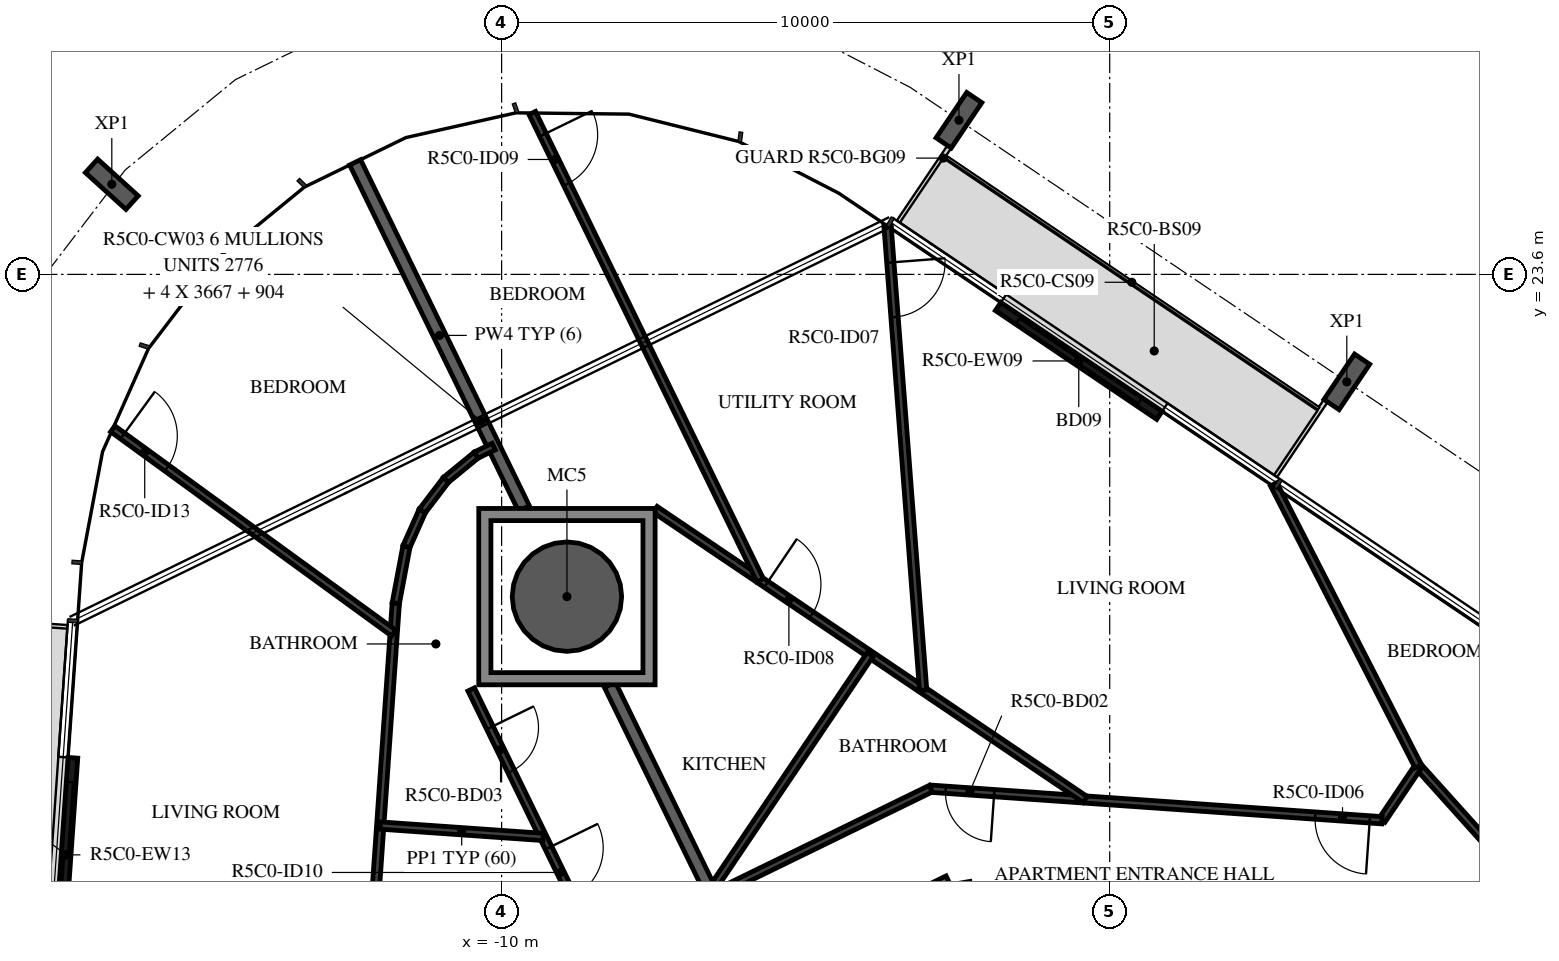
"""IFC4 building model, lengths in metres.
Left out: names, types, materials, properties, quantities, classifications, styles, units other than length and angle.
Written with IfcOpenShell. Run it as: python <this file> out.ifc"""

import sys

from ifc_helpers import new_model, si_unit, direction, frame, frame_2d, origin, origin_2d, place, context, subcontext, project, spatial, polyline, rectangle, hollow_circle, i_section, outline, extrude, element, fill, save


model = new_model("IFC4")
c1 = context("Model", 3, precision=1e-05, world=origin(), true_north=direction((0.0, 1.0)))
c2 = subcontext(c1, "Body", "Model", "MODEL_VIEW")
j1 = project(units=[si_unit("LENGTHUNIT", "METRE"), si_unit("PLANEANGLEUNIT", "RADIAN")], contexts=[c1])
p1 = place(None, origin())
s1 = spatial("IfcSite", under=j1, at=p1, CompositionType="ELEMENT")
p2 = place(p1, origin())
s2 = spatial("IfcBuilding", under=s1, at=p2, CompositionType="ELEMENT")
p3 = place(p2, frame((0.0, 0.0, 209.4)))
s3 = spatial("IfcBuildingStorey", under=s2, at=p3, CompositionType="ELEMENT", Elevation=209.4)
p4 = place(p3, frame((-8.926, 18.301, -0.38), z_axis=(0.0, 0.0, 1.0), x_axis=(1.0, 0.0, 0.0)))
e1 = element("IfcColumn", 1, at=p4, inside=s3, PredefinedType="COLUMN", context=c2, shape_type="SweptSolid", body=[
    extrude(hollow_circle(Radius=0.9, WallThickness=0.04, at=origin_2d()), origin(), (0.0, 0.0, 1.0), 3.5),
])
for number, where, z_axis, x_axis in (
    (2, (3.899, 21.833, -0.38), (0.0, 0.0, 1.0), (0.829, -0.559, 0.0)),
    (3, (-2.479, 26.135, -0.38), (0.0, 0.0, 1.0), (0.829, -0.559, 0.0)),
    (4, (-16.411, 25.082, -0.38), (0.0, 0.0, 1.0), (0.671, 0.741, 0.0)),
):
    element("IfcColumn", number, at=place(p3, frame(where, z_axis=z_axis, x_axis=x_axis)), inside=s3, PredefinedType="COLUMN", context=c2, shape_type="SweptSolid", body=[
        extrude(i_section(OverallWidth=0.3, OverallDepth=0.9, WebThickness=0.019, FlangeThickness=0.035, FilletRadius=0.03, at=origin_2d()), origin(), (0.0, 0.0, 1.0), 3.5),
    ])
p5 = place(p3, frame((0.818, 21.282, 0.0), z_axis=(0.0, 0.0, 1.0), x_axis=(-0.829044984211, 0.559181915082, 0.0)))
e5 = element("IfcWall", 5, at=p5, inside=s3, PredefinedType="STANDARD", context=c2, shape_type="SweptSolid", body=[
    extrude(rectangle(XDim=3.2, YDim=0.16, at=frame_2d((1.6, 0.0))), origin(), (0.0, 0.0, 1.0), 3.12),
])
p6 = place(p5, frame((0.4, 0.0, 0.0)))
e6 = element("IfcOpeningElement", 6, at=p6, cuts=e5, PredefinedType="OPENING", context=c2, shape_type="SweptSolid", body=[
    extrude(rectangle(XDim=2.4, YDim=2.4, at=frame_2d((1.2, 1.2))), frame((0.0, 0.09, 0.0), z_axis=(0.0, -1.0, 0.0), x_axis=(1.0, 0.0, 0.0)), (0.0, 0.0, 1.0), 0.18),
])
p7 = place(p3, frame((-17.051, 15.65, 0.0), z_axis=(0.0, 0.0, 1.0), x_axis=(-0.069734222855, -0.997565605944, 0.0)))
e7 = element("IfcWall", 7, at=p7, inside=s3, PredefinedType="STANDARD", context=c2, shape_type="SweptSolid", body=[
    extrude(rectangle(XDim=3.2, YDim=0.16, at=frame_2d((1.6, 0.0))), origin(), (0.0, 0.0, 1.0), 3.12),
])
p8 = place(p7, frame((0.4, 0.0, 0.0)))
e8 = element("IfcOpeningElement", 8, at=p8, cuts=e7, PredefinedType="OPENING", context=c2, shape_type="SweptSolid", body=[
    extrude(rectangle(XDim=2.4, YDim=2.4, at=frame_2d((1.2, 1.2))), frame((0.0, 0.09, 0.0), z_axis=(0.0, -1.0, 0.0), x_axis=(1.0, 0.0, 0.0)), (0.0, 0.0, 1.0), 0.18),
])
p9 = place(p3, frame((-2.647, 13.618, 0.0), z_axis=(0.0, 0.0, 1.0), x_axis=(-0.898796543751, -0.438366026218, 0.0)))
e9 = element("IfcWall", 9, at=p9, inside=s3, PredefinedType="STANDARD", context=c2, shape_type="SweptSolid", body=[
    extrude(rectangle(XDim=7.181, YDim=0.2, at=frame_2d((3.591, 0.0))), origin(), (0.0, 0.0, 1.0), 3.12),
])
p10 = place(p3, frame((-8.219, 16.851, 0.0), z_axis=(0.0, 0.0, 1.0), x_axis=(0.438291091101, -0.898833087654, 0.0)))
e10 = element("IfcWall", 10, at=p10, inside=s3, PredefinedType="STANDARD", context=c2, shape_type="SweptSolid", body=[
    extrude(rectangle(XDim=3.774, YDim=0.2, at=frame_2d((1.887, 0.0))), origin(), (0.0, 0.0, 1.0), 3.12),
])
p11 = place(p3, frame((-12.409, 25.442, 0.0), z_axis=(0.0, 0.0, 1.0), x_axis=(0.43838641251, -0.898786600549, 0.0)))
e11 = element("IfcWall", 11, at=p11, inside=s3, PredefinedType="STANDARD", context=c2, shape_type="SweptSolid", body=[
    extrude(rectangle(XDim=6.333, YDim=0.2, at=frame_2d((3.166, 0.0))), origin(), (0.0, 0.0, 1.0), 3.12),
])
p12 = place(p3, frame((7.269, 13.07, 0.0), z_axis=(0.0, 0.0, 1.0), x_axis=(-0.668495993587, 0.743715743116, 0.0)))
e12 = element("IfcWall", 12, at=p12, inside=s3, PredefinedType="PARTITIONING", context=c2, shape_type="SweptSolid", body=[
    extrude(rectangle(XDim=3.281, YDim=0.12, at=frame_2d((1.641, 0.0))), origin(), (0.0, 0.0, 1.0), 3.12),
])
p13 = place(p12, frame((0.2, 0.0, 0.0)))
e13 = element("IfcOpeningElement", 13, at=p13, cuts=e12, PredefinedType="OPENING", context=c2, shape_type="SweptSolid", body=[
    extrude(rectangle(XDim=0.9, YDim=2.1, at=frame_2d((0.45, 1.05))), frame((0.0, 0.07, 0.0), z_axis=(0.0, -1.0, 0.0), x_axis=(1.0, 0.0, 0.0)), (0.0, 0.0, 1.0), 0.14),
])
p14 = place(p3, frame((5.075, 15.51, 0.0), z_axis=(0.0, 0.0, 1.0), x_axis=(-0.559221936342, -0.829017988896, 0.0)))
e14 = element("IfcWall", 14, at=p14, inside=s3, PredefinedType="PARTITIONING", context=c2, shape_type="SweptSolid", body=[
    extrude(rectangle(XDim=1.07, YDim=0.12, at=frame_2d((0.535, 0.0))), origin(), (0.0, 0.0, 1.0), 3.12),
])
p15 = place(p3, frame((4.477, 14.623, 0.0), z_axis=(0.0, 0.0, 1.0), x_axis=(-0.997564862172, 0.069744861884, 0.0)))
e15 = element("IfcWall", 15, at=p15, inside=s3, PredefinedType="PARTITIONING", context=c2, shape_type="SweptSolid", body=[
    extrude(rectangle(XDim=7.438, YDim=0.12, at=frame_2d((3.719, 0.0))), origin(), (0.0, 0.0, 1.0), 3.12),
])
p16 = place(p15, frame((0.2, 0.0, 0.0)))
e16 = element("IfcOpeningElement", 16, at=p16, cuts=e15, PredefinedType="OPENING", context=c2, shape_type="SweptSolid", body=[
    extrude(rectangle(XDim=0.9, YDim=2.1, at=frame_2d((0.45, 1.05))), frame((0.0, 0.07, 0.0), z_axis=(0.0, -1.0, 0.0), x_axis=(1.0, 0.0, 0.0)), (0.0, 0.0, 1.0), 0.14),
])
p17 = place(p15, frame((6.392, 0.0, 0.0)))
e17 = element("IfcOpeningElement", 17, at=p17, cuts=e15, PredefinedType="OPENING", context=c2, shape_type="SweptSolid", body=[
    extrude(rectangle(XDim=0.8, YDim=2.1, at=frame_2d((0.4, 1.05))), frame((0.0, 0.07, 0.0), z_axis=(0.0, -1.0, 0.0), x_axis=(1.0, 0.0, 0.0)), (0.0, 0.0, 1.0), 0.14),
])
p18 = place(p3, frame((-2.943, 15.142, 0.0), z_axis=(0.0, 0.0, 1.0), x_axis=(-0.89881075705, -0.438336883014, 0.0)))
e18 = element("IfcWall", 18, at=p18, inside=s3, PredefinedType="PARTITIONING", context=c2, shape_type="SweptSolid", body=[
    extrude(rectangle(XDim=3.992, YDim=0.12, at=frame_2d((1.996, 0.0))), origin(), (0.0, 0.0, 1.0), 3.12),
])
p19 = place(p3, frame((2.696, 20.148, 0.0), z_axis=(0.0, 0.0, 1.0), x_axis=(0.456387956197, -0.889780890691, 0.0)))
e19 = element("IfcWall", 19, at=p19, inside=s3, PredefinedType="PARTITIONING", context=c2, shape_type="SweptSolid", body=[
    extrude(rectangle(XDim=5.213, YDim=0.12, at=frame_2d((2.606, 0.0))), origin(), (0.0, 0.0, 1.0), 3.12),
])
p20 = place(p3, frame((-7.476, 19.735, 0.0), z_axis=(0.0, 0.0, 1.0), x_axis=(0.829035412992, -0.559196105142, 0.0)))
e20 = element("IfcWall", 20, at=p20, inside=s3, PredefinedType="PARTITIONING", context=c2, shape_type="SweptSolid", body=[
    extrude(rectangle(XDim=8.531, YDim=0.12, at=frame_2d((4.266, 0.0))), origin(), (0.0, 0.0, 1.0), 3.12),
])
p21 = place(p20, frame((2.204, 0.0, 0.0)))
e21 = element("IfcOpeningElement", 21, at=p21, cuts=e20, PredefinedType="OPENING", context=c2, shape_type="SweptSolid", body=[
    extrude(rectangle(XDim=0.9, YDim=2.1, at=frame_2d((0.45, 1.05))), frame((0.0, 0.07, 0.0), z_axis=(0.0, -1.0, 0.0), x_axis=(1.0, 0.0, 0.0)), (0.0, 0.0, 1.0), 0.14),
])
p22 = place(p3, frame((-3.653, 24.394, 0.0), z_axis=(0.0, 0.0, 1.0), x_axis=(0.076513576433, -0.997068539581, 0.0)))
e22 = element("IfcWall", 22, at=p22, inside=s3, PredefinedType="PARTITIONING", context=c2, shape_type="SweptSolid", body=[
    extrude(rectangle(XDim=7.655, YDim=0.12, at=frame_2d((3.827, 0.0))), origin(), (0.0, 0.0, 1.0), 3.12),
])
p23 = place(p22, frame((0.6, 0.0, 0.0)))
e23 = element("IfcOpeningElement", 23, at=p23, cuts=e22, PredefinedType="OPENING", context=c2, shape_type="SweptSolid", body=[
    extrude(rectangle(XDim=0.9, YDim=2.1, at=frame_2d((0.45, 1.05))), frame((0.0, 0.07, 0.0), z_axis=(0.0, -1.0, 0.0), x_axis=(1.0, 0.0, 0.0)), (0.0, 0.0, 1.0), 0.14),
])
p24 = place(p3, frame((-3.939, 17.35, 0.0), z_axis=(0.0, 0.0, 1.0), x_axis=(-0.559193216274, -0.829037361566, 0.0)))
e24 = element("IfcWall", 24, at=p24, inside=s3, PredefinedType="PARTITIONING", context=c2, shape_type="SweptSolid", body=[
    extrude(rectangle(XDim=4.694, YDim=0.12, at=frame_2d((2.347, 0.0))), origin(), (0.0, 0.0, 1.0), 3.12),
])
p25 = place(p3, frame((-9.496, 26.254, 0.0), z_axis=(0.0, 0.0, 1.0), x_axis=(0.438361739807, -0.89879863433, 0.0)))
e25 = element("IfcWall", 25, at=p25, inside=s3, PredefinedType="PARTITIONING", context=c2, shape_type="SweptSolid", body=[
    extrude(rectangle(XDim=8.549, YDim=0.12, at=frame_2d((4.274, 0.0))), origin(), (0.0, 0.0, 1.0), 3.12),
])
p26 = place(p25, frame((0.4, 0.0, 0.0)))
e26 = element("IfcOpeningElement", 26, at=p26, cuts=e25, PredefinedType="OPENING", context=c2, shape_type="SweptSolid", body=[
    extrude(rectangle(XDim=0.9, YDim=2.1, at=frame_2d((0.45, 1.05))), frame((0.0, 0.07, 0.0), z_axis=(0.0, -1.0, 0.0), x_axis=(1.0, 0.0, 0.0)), (0.0, 0.0, 1.0), 0.14),
])
p27 = place(p3, frame((-10.5, 16.775, 0.0), z_axis=(0.0, 0.0, 1.0), x_axis=(0.438345136783, -0.898806731761, 0.0)))
e27 = element("IfcWall", 27, at=p27, inside=s3, PredefinedType="PARTITIONING", context=c2, shape_type="SweptSolid", body=[
    extrude(rectangle(XDim=4.78, YDim=0.12, at=frame_2d((2.39, 0.0))), origin(), (0.0, 0.0, 1.0), 3.12),
])
p28 = place(p27, frame((0.7, 0.0, 0.0)))
e28 = element("IfcOpeningElement", 28, at=p28, cuts=e27, PredefinedType="OPENING", context=c2, shape_type="SweptSolid", body=[
    extrude(rectangle(XDim=0.8, YDim=2.1, at=frame_2d((0.4, 1.05))), frame((0.0, 0.07, 0.0), z_axis=(0.0, -1.0, 0.0), x_axis=(1.0, 0.0, 0.0)), (0.0, 0.0, 1.0), 0.14),
])
p29 = place(p27, frame((2.899, 0.0, 0.0)))
e29 = element("IfcOpeningElement", 29, at=p29, cuts=e27, PredefinedType="OPENING", context=c2, shape_type="SweptSolid", body=[
    extrude(rectangle(XDim=0.9, YDim=2.1, at=frame_2d((0.45, 1.05))), frame((0.0, 0.07, 0.0), z_axis=(0.0, -1.0, 0.0), x_axis=(1.0, 0.0, 0.0)), (0.0, 0.0, 1.0), 0.14),
])
p30 = place(p3, frame((-12.439, 8.204, 0.0), z_axis=(0.0, 0.0, 1.0), x_axis=(0.069750037523, 0.997564500303, 0.0)))
e30 = element("IfcWall", 30, at=p30, inside=s3, PredefinedType="PARTITIONING", context=c2, shape_type="SweptSolid", body=[
    extrude(rectangle(XDim=10.014, YDim=0.12, at=frame_2d((5.007, 0.0))), origin(), (0.0, 0.0, 1.0), 3.12),
])
p31 = place(p30, frame((1.859, 0.0, 0.0)))
e31 = element("IfcOpeningElement", 31, at=p31, cuts=e30, PredefinedType="OPENING", context=c2, shape_type="SweptSolid", body=[
    extrude(rectangle(XDim=0.9, YDim=2.1, at=frame_2d((0.45, 1.05))), frame((0.0, 0.07, 0.0), z_axis=(0.0, -1.0, 0.0), x_axis=(1.0, 0.0, 0.0)), (0.0, 0.0, 1.0), 0.14),
])
p32 = place(p3, frame((-11.74, 18.194, 0.0), z_axis=(0.0, 0.0, 1.0), x_axis=(0.185144760846, 0.982711258474, 0.0)))
e32 = element("IfcWall", 32, at=p32, inside=s3, PredefinedType="PARTITIONING", context=c2, shape_type="SweptSolid", body=[
    extrude(rectangle(XDim=0.947, YDim=0.12, at=frame_2d((0.473, 0.0))), origin(), (0.0, 0.0, 1.0), 3.12),
])
for number, where, z_axis, x_axis in (
    (33, (-11.565, 19.125, 0.0), (0.0, 0.0, 1.0), (0.407, 0.914, 0.0)),
    (34, (-11.304, 19.711, 0.0), (0.0, 0.0, 1.0), (0.607, 0.795, 0.0)),
    (35, (-10.915, 20.221, 0.0), (0.0, 0.0, 1.0), (0.773, 0.634, 0.0)),
):
    element("IfcWall", number, at=place(p3, frame(where, z_axis=z_axis, x_axis=x_axis)), inside=s3, PredefinedType="PARTITIONING", context=c2, shape_type="SweptSolid", body=[
        extrude(rectangle(XDim=0.642, YDim=0.12, at=frame_2d((0.321, 0.0))), origin(), (0.0, 0.0, 1.0), 3.12),
    ])
p33 = place(p3, frame((-10.418, 20.628, 0.0), z_axis=(0.0, 0.0, 1.0), x_axis=(0.898943795765, 0.438063981692, 0.0)))
e36 = element("IfcWall", 36, at=p33, inside=s3, PredefinedType="PARTITIONING", context=c2, shape_type="SweptSolid", body=[
    extrude(rectangle(XDim=0.321, YDim=0.12, at=frame_2d((0.161, 0.0))), origin(), (0.0, 0.0, 1.0), 3.12),
])
p34 = place(p3, frame((-16.395, 21.061, 0.0), z_axis=(0.0, 0.0, 1.0), x_axis=(0.808810002497, -0.58807004673, 0.0)))
e37 = element("IfcWall", 37, at=p34, inside=s3, PredefinedType="PARTITIONING", context=c2, shape_type="SweptSolid", body=[
    extrude(rectangle(XDim=5.713, YDim=0.12, at=frame_2d((2.856, 0.0))), origin(), (0.0, 0.0, 1.0), 3.12),
])
p35 = place(p34, frame((0.2, 0.0, 0.0)))
e38 = element("IfcOpeningElement", 38, at=p35, cuts=e37, PredefinedType="OPENING", context=c2, shape_type="SweptSolid", body=[
    extrude(rectangle(XDim=0.9, YDim=2.1, at=frame_2d((0.45, 1.05))), frame((0.0, 0.07, 0.0), z_axis=(0.0, -1.0, 0.0), x_axis=(1.0, 0.0, 0.0)), (0.0, 0.0, 1.0), 0.14),
])
p36 = place(p3, frame((-11.996, 14.536, 0.0), z_axis=(0.0, 0.0, 1.0), x_axis=(0.997565991425, -0.069728708231, 0.0)))
e39 = element("IfcWall", 39, at=p36, inside=s3, PredefinedType="PARTITIONING", context=c2, shape_type="SweptSolid", body=[
    extrude(rectangle(XDim=2.686, YDim=0.12, at=frame_2d((1.343, 0.0))), origin(), (0.0, 0.0, 1.0), 3.12),
])
p37 = place(p3, origin())
e40 = element("IfcWall", 40, at=p37, inside=s3, PredefinedType="STANDARD", context=c2, shape_type="SweptSolid", body=[
    extrude(outline(polyline([(-7.476, 19.751), (-7.476, 16.851), (-10.376, 16.851), (-10.376, 19.751), (-7.476, 19.751)]), holes=[polyline([(-10.176, 17.051), (-7.676, 17.051), (-7.676, 19.551), (-10.176, 19.551), (-10.176, 17.051)])]), origin(), (0.0, 0.0, 1.0), 3.12),
])
p38 = place(p6, origin())
e41 = element("IfcDoor", 41, at=p38, inside=s3, OperationType="DOUBLE_DOOR_SLIDING", PredefinedType="DOOR", context=c2, shape_type="SweptSolid", body=[
    extrude(rectangle(XDim=2.4, YDim=2.4, at=frame_2d((1.2, 1.2))), frame((0.0, 0.025, 0.0), z_axis=(0.0, -1.0, 0.0), x_axis=(1.0, 0.0, 0.0)), (0.0, 0.0, 1.0), 0.05),
])
fill(e6, e41)
p39 = place(p8, origin())
e42 = element("IfcDoor", 42, at=p39, inside=s3, OperationType="DOUBLE_DOOR_SLIDING", PredefinedType="DOOR", context=c2, shape_type="SweptSolid", body=[
    extrude(rectangle(XDim=2.4, YDim=2.4, at=frame_2d((1.2, 1.2))), frame((0.0, 0.025, 0.0), z_axis=(0.0, -1.0, 0.0), x_axis=(1.0, 0.0, 0.0)), (0.0, 0.0, 1.0), 0.05),
])
fill(e8, e42)
p40 = place(p16, origin())
e43 = element("IfcDoor", 43, at=p40, inside=s3, OperationType="SINGLE_SWING_RIGHT", PredefinedType="DOOR", context=c2, shape_type="SweptSolid", body=[
    extrude(rectangle(XDim=0.9, YDim=2.1, at=frame_2d((0.45, 1.05))), frame((0.0, 0.025, 0.0), z_axis=(0.0, -1.0, 0.0), x_axis=(1.0, 0.0, 0.0)), (0.0, 0.0, 1.0), 0.05),
])
fill(e16, e43)
p41 = place(p17, origin())
e44 = element("IfcDoor", 44, at=p41, inside=s3, OperationType="SINGLE_SWING_RIGHT", PredefinedType="DOOR", context=c2, shape_type="SweptSolid", body=[
    extrude(rectangle(XDim=0.8, YDim=2.1, at=frame_2d((0.4, 1.05))), frame((0.0, 0.025, 0.0), z_axis=(0.0, -1.0, 0.0), x_axis=(1.0, 0.0, 0.0)), (0.0, 0.0, 1.0), 0.05),
])
fill(e17, e44)
p42 = place(p23, origin())
e45 = element("IfcDoor", 45, at=p42, inside=s3, OperationType="SINGLE_SWING_RIGHT", PredefinedType="DOOR", context=c2, shape_type="SweptSolid", body=[
    extrude(rectangle(XDim=0.9, YDim=2.1, at=frame_2d((0.45, 1.05))), frame((0.0, 0.025, 0.0), z_axis=(0.0, -1.0, 0.0), x_axis=(1.0, 0.0, 0.0)), (0.0, 0.0, 1.0), 0.05),
])
fill(e23, e45)
p43 = place(p21, origin())
e46 = element("IfcDoor", 46, at=p43, inside=s3, OperationType="SINGLE_SWING_LEFT", PredefinedType="DOOR", context=c2, shape_type="SweptSolid", body=[
    extrude(rectangle(XDim=0.9, YDim=2.1, at=frame_2d((0.45, 1.05))), frame((0.0, 0.025, 0.0), z_axis=(0.0, -1.0, 0.0), x_axis=(1.0, 0.0, 0.0)), (0.0, 0.0, 1.0), 0.05),
])
fill(e21, e46)
p44 = place(p26, origin())
e47 = element("IfcDoor", 47, at=p44, inside=s3, OperationType="SINGLE_SWING_RIGHT", PredefinedType="DOOR", context=c2, shape_type="SweptSolid", body=[
    extrude(rectangle(XDim=0.9, YDim=2.1, at=frame_2d((0.45, 1.05))), frame((0.0, 0.025, 0.0), z_axis=(0.0, -1.0, 0.0), x_axis=(1.0, 0.0, 0.0)), (0.0, 0.0, 1.0), 0.05),
])
fill(e26, e47)
p45 = place(p28, origin())
e48 = element("IfcDoor", 48, at=p45, inside=s3, OperationType="SINGLE_SWING_LEFT", PredefinedType="DOOR", context=c2, shape_type="SweptSolid", body=[
    extrude(rectangle(XDim=0.8, YDim=2.1, at=frame_2d((0.4, 1.05))), frame((0.0, 0.025, 0.0), z_axis=(0.0, -1.0, 0.0), x_axis=(1.0, 0.0, 0.0)), (0.0, 0.0, 1.0), 0.05),
])
fill(e28, e48)
p46 = place(p29, origin())
e49 = element("IfcDoor", 49, at=p46, inside=s3, OperationType="SINGLE_SWING_LEFT", PredefinedType="DOOR", context=c2, shape_type="SweptSolid", body=[
    extrude(rectangle(XDim=0.9, YDim=2.1, at=frame_2d((0.45, 1.05))), frame((0.0, 0.025, 0.0), z_axis=(0.0, -1.0, 0.0), x_axis=(1.0, 0.0, 0.0)), (0.0, 0.0, 1.0), 0.05),
])
fill(e29, e49)
p47 = place(p35, origin())
e50 = element("IfcDoor", 50, at=p47, inside=s3, OperationType="SINGLE_SWING_LEFT", PredefinedType="DOOR", context=c2, shape_type="SweptSolid", body=[
    extrude(rectangle(XDim=0.9, YDim=2.1, at=frame_2d((0.45, 1.05))), frame((0.0, 0.025, 0.0), z_axis=(0.0, -1.0, 0.0), x_axis=(1.0, 0.0, 0.0)), (0.0, 0.0, 1.0), 0.05),
])
fill(e38, e50)
save(model, sys.argv[1])
